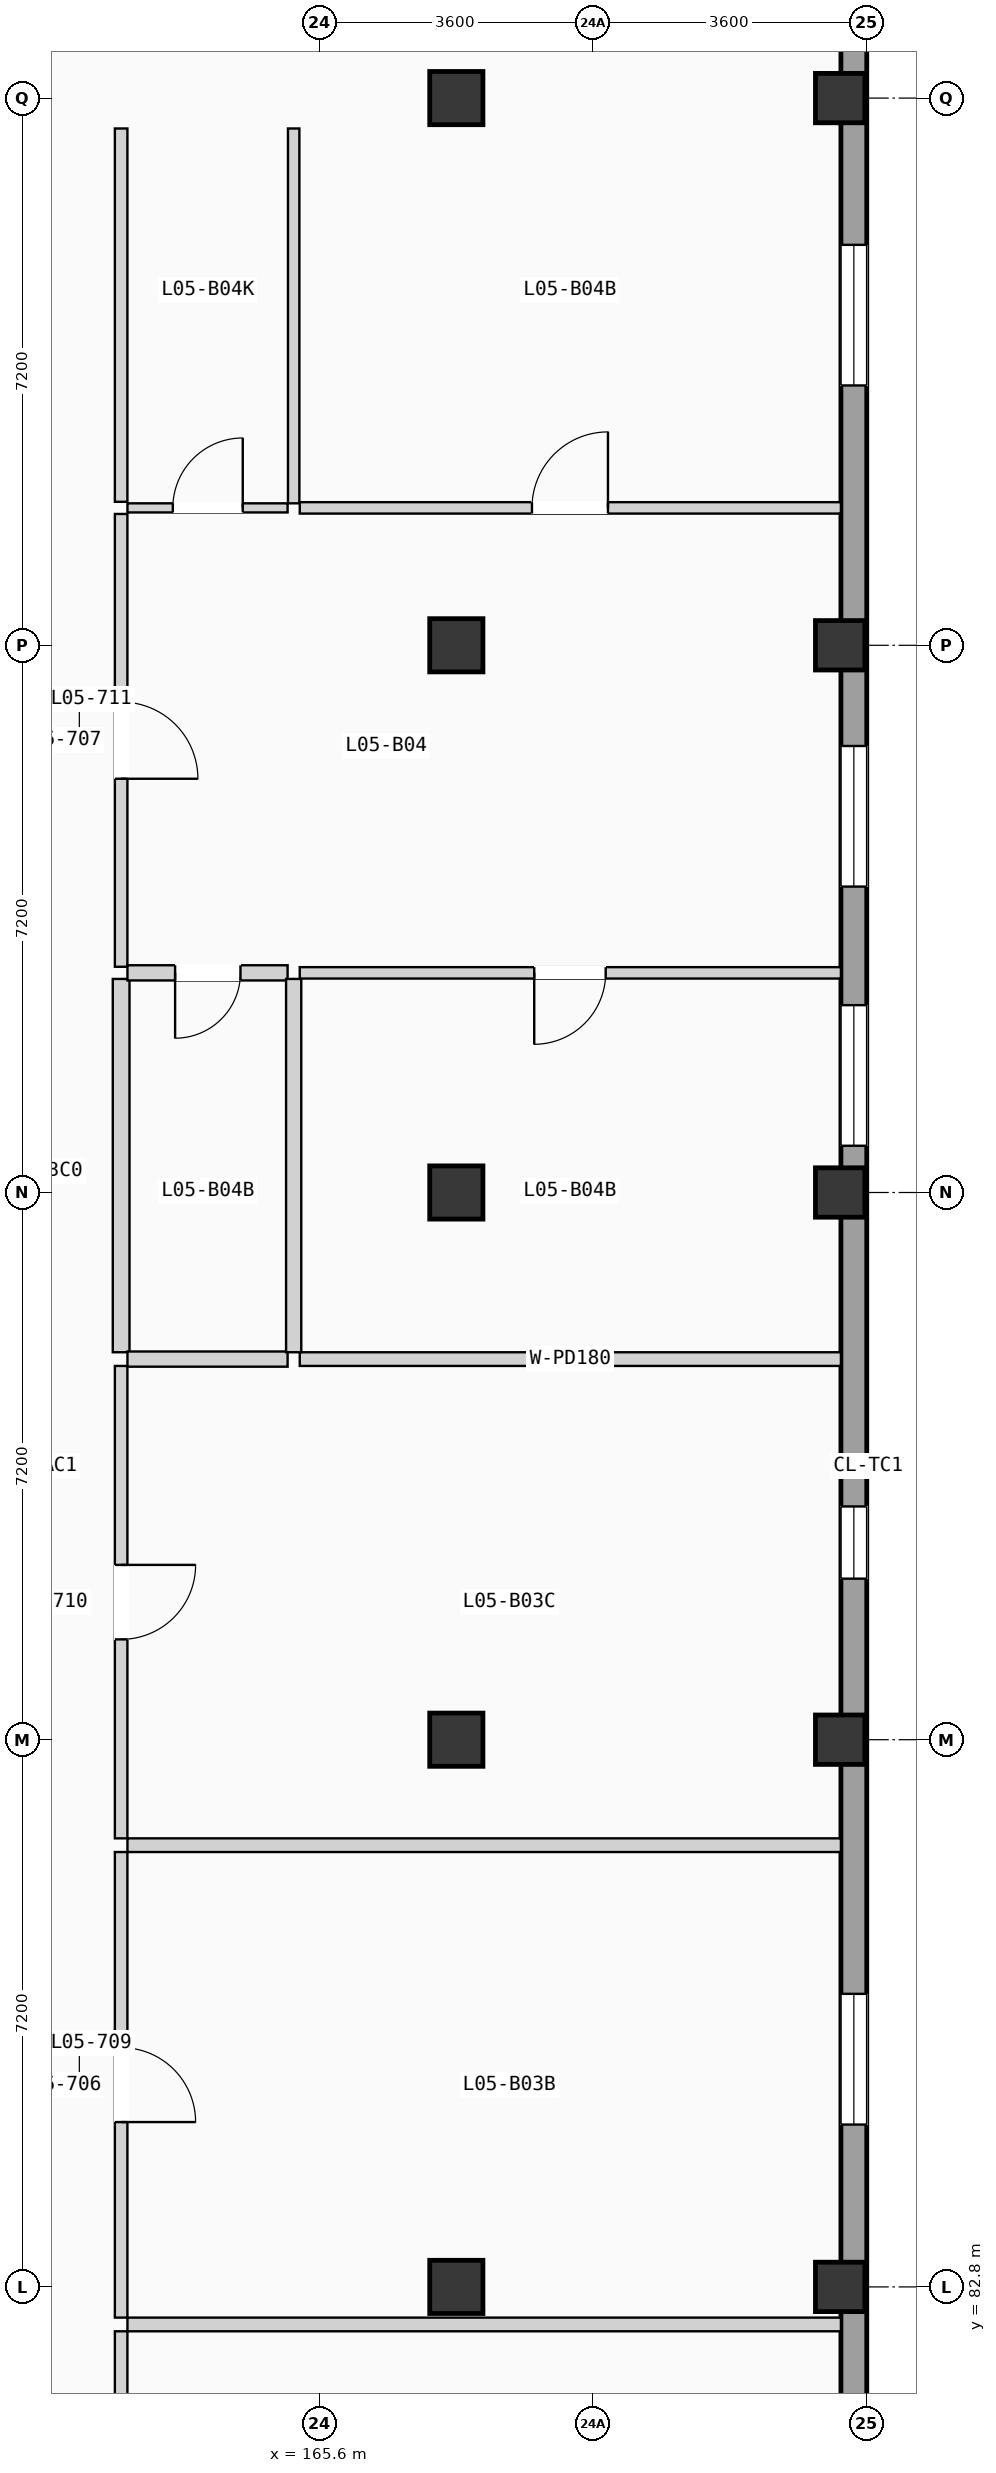
"""IFC4 building model, lengths in metres.
Left out: names, types, materials, properties, quantities, classifications, styles, units other than length and angle.
Written with IfcOpenShell. Run it as: python <this file> out.ifc"""

import sys

from ifc_helpers import new_model, si_unit, direction, frame, frame_2d, origin, origin_2d, place, context, subcontext, project, spatial, rectangle, extrude, element, fill, save


model = new_model("IFC4")
c1 = context("Model", 3, precision=1e-05, world=origin(), true_north=direction((0.0, 1.0)))
c2 = subcontext(c1, "Body", "Model", "MODEL_VIEW")
j1 = project(units=[si_unit("LENGTHUNIT", "METRE"), si_unit("PLANEANGLEUNIT", "RADIAN")], contexts=[c1])
p1 = place(None, origin())
s1 = spatial("IfcSite", under=j1, at=p1, CompositionType="ELEMENT")
p2 = place(p1, origin())
s2 = spatial("IfcBuilding", under=s1, at=p2, CompositionType="ELEMENT")
p3 = place(p2, frame((0.0, 0.0, 18.375)))
s3 = spatial("IfcBuildingStorey", under=s2, at=p3, CompositionType="ELEMENT", Elevation=18.375)
for number, where, z_axis, x_axis in (
    (1, (167.4, 82.8, 0.0), (0.0, 0.0, 1.0), (1.0, 0.0, 0.0)),
    (2, (167.4, 90.0, 0.0), (0.0, 0.0, 1.0), (1.0, 0.0, 0.0)),
    (3, (167.4, 97.2, 0.0), (0.0, 0.0, 1.0), (1.0, 0.0, 0.0)),
    (4, (167.4, 104.4, 0.0), (0.0, 0.0, 1.0), (1.0, 0.0, 0.0)),
    (5, (167.4, 111.6, 0.0), (0.0, 0.0, 1.0), (1.0, 0.0, 0.0)),
):
    element("IfcColumn", number, at=place(p3, frame(where, z_axis=z_axis, x_axis=x_axis)), inside=s3, PredefinedType="COLUMN", context=c2, shape_type="SweptSolid", body=[
        extrude(rectangle(XDim=0.7, YDim=0.7, at=origin_2d()), origin(), (0.0, 0.0, 1.0), 3.15),
    ])
for number, where, z_axis, x_axis in (
    (6, (172.45, 82.8, 0.0), (0.0, 0.0, 1.0), (1.0, 0.0, 0.0)),
    (7, (172.45, 90.0, 0.0), (0.0, 0.0, 1.0), (1.0, 0.0, 0.0)),
    (8, (172.45, 97.2, 0.0), (0.0, 0.0, 1.0), (1.0, 0.0, 0.0)),
    (9, (172.45, 104.4, 0.0), (0.0, 0.0, 1.0), (1.0, 0.0, 0.0)),
    (10, (172.45, 111.6, 0.0), (0.0, 0.0, 1.0), (1.0, 0.0, 0.0)),
):
    element("IfcColumn", number, at=place(p3, frame(where, z_axis=z_axis, x_axis=x_axis)), inside=s3, PredefinedType="COLUMN", context=c2, shape_type="SweptSolid", body=[
        extrude(rectangle(XDim=0.65, YDim=0.65, at=origin_2d()), origin(), (0.0, 0.0, 1.0), 3.15),
    ])
p4 = place(p3, frame((172.63, 68.74, 0.0), z_axis=(0.0, 0.0, 1.0), x_axis=(0.0, 1.0, 0.0)))
e11 = element("IfcWall", 11, at=p4, inside=s3, PredefinedType="SOLIDWALL", context=c2, shape_type="SweptSolid", body=[
    extrude(rectangle(XDim=49.72, YDim=0.34, at=frame_2d((24.86, 0.0))), origin(), (0.0, 0.0, 1.0), 2.89),
])
p5 = place(p4, frame((9.508, 0.0, 0.705)))
e12 = element("IfcOpeningElement", 12, at=p5, cuts=e11, PredefinedType="OPENING", context=c2, shape_type="SweptSolid", body=[
    extrude(rectangle(XDim=1.72, YDim=1.5, at=frame_2d((0.86, 0.75))), frame((0.0, 0.18, 0.0), z_axis=(0.0, -1.0, 0.0), x_axis=(1.0, 0.0, 0.0)), (0.0, 0.0, 1.0), 0.36),
])
p6 = place(p4, frame((16.196, 0.0, 0.555)))
e13 = element("IfcOpeningElement", 13, at=p6, cuts=e11, PredefinedType="OPENING", context=c2, shape_type="SweptSolid", body=[
    extrude(rectangle(XDim=1.72, YDim=1.65, at=frame_2d((0.86, 0.825))), frame((0.0, 0.18, 0.0), z_axis=(0.0, -1.0, 0.0), x_axis=(1.0, 0.0, 0.0)), (0.0, 0.0, 1.0), 0.36),
])
p7 = place(p4, frame((23.379, 0.0, 0.85)))
e14 = element("IfcOpeningElement", 14, at=p7, cuts=e11, PredefinedType="OPENING", context=c2, shape_type="SweptSolid", body=[
    extrude(rectangle(XDim=0.95, YDim=1.2, at=frame_2d((0.475, 0.6))), frame((0.0, 0.18, 0.0), z_axis=(0.0, -1.0, 0.0), x_axis=(1.0, 0.0, 0.0)), (0.0, 0.0, 1.0), 0.36),
])
p8 = place(p4, frame((32.485, 0.0, 0.9)))
e15 = element("IfcOpeningElement", 15, at=p8, cuts=e11, PredefinedType="OPENING", context=c2, shape_type="SweptSolid", body=[
    extrude(rectangle(XDim=1.85, YDim=1.2, at=frame_2d((0.925, 0.6))), frame((0.0, 0.18, 0.0), z_axis=(0.0, -1.0, 0.0), x_axis=(1.0, 0.0, 0.0)), (0.0, 0.0, 1.0), 0.36),
])
p9 = place(p4, frame((29.075, 0.0, 0.855)))
e16 = element("IfcOpeningElement", 16, at=p9, cuts=e11, PredefinedType="OPENING", context=c2, shape_type="SweptSolid", body=[
    extrude(rectangle(XDim=1.85, YDim=1.35, at=frame_2d((0.925, 0.675))), frame((0.0, 0.18, 0.0), z_axis=(0.0, -1.0, 0.0), x_axis=(1.0, 0.0, 0.0)), (0.0, 0.0, 1.0), 0.36),
])
p10 = place(p4, frame((39.079, 0.0, 0.705)))
e17 = element("IfcOpeningElement", 17, at=p10, cuts=e11, PredefinedType="OPENING", context=c2, shape_type="SweptSolid", body=[
    extrude(rectangle(XDim=1.85, YDim=1.5, at=frame_2d((0.925, 0.75))), frame((0.0, 0.18, 0.0), z_axis=(0.0, -1.0, 0.0), x_axis=(1.0, 0.0, 0.0)), (0.0, 0.0, 1.0), 0.36),
])
p11 = place(p3, frame((162.99, 75.945, 0.0), z_axis=(0.0, 0.0, 1.0), x_axis=(0.0, 1.0, 0.0)))
e18 = element("IfcWall", 18, at=p11, inside=s3, PredefinedType="PARTITIONING", context=c2, shape_type="SweptSolid", body=[
    extrude(rectangle(XDim=6.271, YDim=0.165, at=frame_2d((3.135, 0.0))), origin(), (0.0, 0.0, 1.0), 2.87),
])
p12 = place(p11, frame((2.673, 0.0, 0.0)))
e19 = element("IfcOpeningElement", 19, at=p12, cuts=e18, PredefinedType="OPENING", context=c2, shape_type="SweptSolid", body=[
    extrude(rectangle(XDim=0.98, YDim=2.08, at=frame_2d((0.49, 1.04))), frame((0.0, 0.093, 0.0), z_axis=(0.0, -1.0, 0.0), x_axis=(1.0, 0.0, 0.0)), (0.0, 0.0, 1.0), 0.185),
])
p13 = place(p3, frame((162.99, 82.396, 0.0), z_axis=(0.0, 0.0, 1.0), x_axis=(0.0, 1.0, 0.0)))
e20 = element("IfcWall", 20, at=p13, inside=s3, PredefinedType="PARTITIONING", context=c2, shape_type="SweptSolid", body=[
    extrude(rectangle(XDim=6.126, YDim=0.165, at=frame_2d((3.063, 0.0))), origin(), (0.0, 0.0, 1.0), 2.87),
])
p14 = place(p13, frame((2.573, 0.0, 0.0)))
e21 = element("IfcOpeningElement", 21, at=p14, cuts=e20, PredefinedType="OPENING", context=c2, shape_type="SweptSolid", body=[
    extrude(rectangle(XDim=0.98, YDim=2.08, at=frame_2d((0.49, 1.04))), frame((0.0, 0.093, 0.0), z_axis=(0.0, -1.0, 0.0), x_axis=(1.0, 0.0, 0.0)), (0.0, 0.0, 1.0), 0.185),
])
p15 = place(p3, frame((162.99, 88.702, 0.0), z_axis=(0.0, 0.0, 1.0), x_axis=(0.0, 1.0, 0.0)))
e22 = element("IfcWall", 22, at=p15, inside=s3, PredefinedType="PARTITIONING", context=c2, shape_type="SweptSolid", body=[
    extrude(rectangle(XDim=6.216, YDim=0.165, at=frame_2d((3.108, 0.0))), origin(), (0.0, 0.0, 1.0), 2.87),
])
p16 = place(p15, frame((2.618, 0.0, 0.0)))
e23 = element("IfcOpeningElement", 23, at=p16, cuts=e22, PredefinedType="OPENING", context=c2, shape_type="SweptSolid", body=[
    extrude(rectangle(XDim=0.98, YDim=2.08, at=frame_2d((0.49, 1.04))), frame((0.0, 0.093, 0.0), z_axis=(0.0, -1.0, 0.0), x_axis=(1.0, 0.0, 0.0)), (0.0, 0.0, 1.0), 0.185),
])
p17 = place(p3, frame((162.99, 100.17, 0.0), z_axis=(0.0, 0.0, 1.0), x_axis=(0.0, 1.0, 0.0)))
e24 = element("IfcWall", 24, at=p17, inside=s3, PredefinedType="PARTITIONING", context=c2, shape_type="SweptSolid", body=[
    extrude(rectangle(XDim=5.958, YDim=0.165, at=frame_2d((2.979, 0.0))), origin(), (0.0, 0.0, 1.0), 2.87),
])
p18 = place(p17, frame((2.474, 0.0, 0.0)))
e25 = element("IfcOpeningElement", 25, at=p18, cuts=e24, PredefinedType="OPENING", context=c2, shape_type="SweptSolid", body=[
    extrude(rectangle(XDim=1.01, YDim=2.11, at=frame_2d((0.505, 1.055))), frame((0.0, 0.093, 0.0), z_axis=(0.0, -1.0, 0.0), x_axis=(1.0, 0.0, 0.0)), (0.0, 0.0, 1.0), 0.185),
])
p19 = place(p3, frame((162.99, 95.098, 0.0), z_axis=(0.0, 0.0, 1.0), x_axis=(0.0, 1.0, 0.0)))
e26 = element("IfcWall", 26, at=p19, inside=s3, PredefinedType="PLUMBINGWALL", context=c2, shape_type="SweptSolid", body=[
    extrude(rectangle(XDim=4.912, YDim=0.22, at=frame_2d((2.456, 0.0))), origin(), (0.0, 0.0, 1.0), 2.87),
])
p20 = place(p3, frame((162.99, 106.288, 0.0), z_axis=(0.0, 0.0, 1.0), x_axis=(0.0, 1.0, 0.0)))
e27 = element("IfcWall", 27, at=p20, inside=s3, PredefinedType="PARTITIONING", context=c2, shape_type="SweptSolid", body=[
    extrude(rectangle(XDim=4.912, YDim=0.165, at=frame_2d((2.456, 0.0))), origin(), (0.0, 0.0, 1.0), 2.87),
])
for number, where, z_axis, x_axis in (
    (28, (163.073, 82.306, 0.0), (0.0, 0.0, 1.0), (1.0, 0.0, 0.0)),
    (29, (163.073, 88.612, 0.0), (0.0, 0.0, 1.0), (1.0, 0.0, 0.0)),
):
    element("IfcWall", number, at=place(p3, frame(where, z_axis=z_axis, x_axis=x_axis)), inside=s3, PredefinedType="PARTITIONING", context=c2, shape_type="SweptSolid", body=[
        extrude(rectangle(XDim=9.387, YDim=0.18, at=frame_2d((4.693, 0.0))), origin(), (0.0, 0.0, 1.0), 2.87),
    ])
p21 = place(p3, frame((163.073, 95.008, 0.0), z_axis=(0.0, 0.0, 1.0), x_axis=(1.0, 0.0, 0.0)))
e30 = element("IfcWall", 30, at=p21, inside=s3, PredefinedType="PLUMBINGWALL", context=c2, shape_type="SweptSolid", body=[
    extrude(rectangle(XDim=2.107, YDim=0.2, at=frame_2d((1.053, 0.0))), origin(), (0.0, 0.0, 1.0), 2.87),
])
p22 = place(p3, frame((165.34, 95.008, 0.0), z_axis=(0.0, 0.0, 1.0), x_axis=(1.0, 0.0, 0.0)))
e31 = element("IfcWall", 31, at=p22, inside=s3, PredefinedType="PARTITIONING", context=c2, shape_type="SweptSolid", body=[
    extrude(rectangle(XDim=7.12, YDim=0.18, at=frame_2d((3.56, 0.0))), origin(), (0.0, 0.0, 1.0), 2.87),
])
p23 = place(p3, frame((163.073, 100.09, 0.0), z_axis=(0.0, 0.0, 1.0), x_axis=(1.0, 0.0, 0.0)))
e32 = element("IfcWall", 32, at=p23, inside=s3, PredefinedType="PLUMBINGWALL", context=c2, shape_type="SweptSolid", body=[
    extrude(rectangle(XDim=2.107, YDim=0.2, at=frame_2d((1.053, 0.0))), origin(), (0.0, 0.0, 1.0), 2.87),
])
p24 = place(p23, frame((0.627, 0.0, 0.0)))
e33 = element("IfcOpeningElement", 33, at=p24, cuts=e32, PredefinedType="OPENING", context=c2, shape_type="SweptSolid", body=[
    extrude(rectangle(XDim=0.86, YDim=2.0, at=frame_2d((0.43, 1.0))), frame((0.0, 0.11, 0.0), z_axis=(0.0, -1.0, 0.0), x_axis=(1.0, 0.0, 0.0)), (0.0, 0.0, 1.0), 0.22),
])
p25 = place(p3, frame((163.073, 106.208, 0.0), z_axis=(0.0, 0.0, 1.0), x_axis=(1.0, 0.0, 0.0)))
e34 = element("IfcWall", 34, at=p25, inside=s3, PredefinedType="PARTITIONING", context=c2, shape_type="SweptSolid", body=[
    extrude(rectangle(XDim=2.107, YDim=0.12, at=frame_2d((1.053, 0.0))), origin(), (0.0, 0.0, 1.0), 2.87),
])
p26 = place(p25, frame((0.597, 0.0, 0.0)))
e35 = element("IfcOpeningElement", 35, at=p26, cuts=e34, PredefinedType="OPENING", context=c2, shape_type="SweptSolid", body=[
    extrude(rectangle(XDim=0.92, YDim=2.02, at=frame_2d((0.46, 1.01))), frame((0.0, 0.07, 0.0), z_axis=(0.0, -1.0, 0.0), x_axis=(1.0, 0.0, 0.0)), (0.0, 0.0, 1.0), 0.14),
])
p27 = place(p3, frame((165.34, 100.09, 0.0), z_axis=(0.0, 0.0, 1.0), x_axis=(1.0, 0.0, 0.0)))
e36 = element("IfcWall", 36, at=p27, inside=s3, PredefinedType="PARTITIONING", context=c2, shape_type="SweptSolid", body=[
    extrude(rectangle(XDim=7.12, YDim=0.15, at=frame_2d((3.56, 0.0))), origin(), (0.0, 0.0, 1.0), 2.87),
])
p28 = place(p27, frame((3.085, 0.0, 0.0)))
e37 = element("IfcOpeningElement", 37, at=p28, cuts=e36, PredefinedType="OPENING", context=c2, shape_type="SweptSolid", body=[
    extrude(rectangle(XDim=0.94, YDim=2.06, at=frame_2d((0.47, 1.03))), frame((0.0, 0.085, 0.0), z_axis=(0.0, -1.0, 0.0), x_axis=(1.0, 0.0, 0.0)), (0.0, 0.0, 1.0), 0.17),
])
p29 = place(p3, frame((165.34, 106.208, 0.0), z_axis=(0.0, 0.0, 1.0), x_axis=(1.0, 0.0, 0.0)))
e38 = element("IfcWall", 38, at=p29, inside=s3, PredefinedType="PARTITIONING", context=c2, shape_type="SweptSolid", body=[
    extrude(rectangle(XDim=7.12, YDim=0.15, at=frame_2d((3.56, 0.0))), origin(), (0.0, 0.0, 1.0), 2.87),
])
p30 = place(p29, frame((3.055, 0.0, 0.0)))
e39 = element("IfcOpeningElement", 39, at=p30, cuts=e38, PredefinedType="OPENING", context=c2, shape_type="SweptSolid", body=[
    extrude(rectangle(XDim=1.0, YDim=2.06, at=frame_2d((0.5, 1.03))), frame((0.0, 0.085, 0.0), z_axis=(0.0, -1.0, 0.0), x_axis=(1.0, 0.0, 0.0)), (0.0, 0.0, 1.0), 0.17),
])
p31 = place(p3, frame((165.26, 95.098, 0.0), z_axis=(0.0, 0.0, 1.0), x_axis=(0.0, 1.0, 0.0)))
e40 = element("IfcWall", 40, at=p31, inside=s3, PredefinedType="PLUMBINGWALL", context=c2, shape_type="SweptSolid", body=[
    extrude(rectangle(XDim=4.912, YDim=0.2, at=frame_2d((2.456, 0.0))), origin(), (0.0, 0.0, 1.0), 2.87),
])
p32 = place(p3, frame((165.26, 106.268, 0.0), z_axis=(0.0, 0.0, 1.0), x_axis=(0.0, 1.0, 0.0)))
e41 = element("IfcWall", 41, at=p32, inside=s3, PredefinedType="PARTITIONING", context=c2, shape_type="SweptSolid", body=[
    extrude(rectangle(XDim=4.932, YDim=0.15, at=frame_2d((2.466, 0.0))), origin(), (0.0, 0.0, 1.0), 2.87),
])
p33 = place(p6, origin())
e42 = element("IfcWindow", 42, at=p33, inside=s3, PartitioningType="DOUBLE_PANEL_VERTICAL", PredefinedType="WINDOW", context=c2, shape_type="SweptSolid", body=[
    extrude(rectangle(XDim=1.72, YDim=1.65, at=frame_2d((0.86, 0.825))), frame((0.0, 0.03, 0.0), z_axis=(0.0, -1.0, 0.0), x_axis=(1.0, 0.0, 0.0)), (0.0, 0.0, 1.0), 0.06),
])
fill(e13, e42)
p34 = place(p7, origin())
e43 = element("IfcWindow", 43, at=p34, inside=s3, PartitioningType="SINGLE_PANEL", PredefinedType="WINDOW", context=c2, shape_type="SweptSolid", body=[
    extrude(rectangle(XDim=0.95, YDim=1.2, at=frame_2d((0.475, 0.6))), frame((0.0, 0.03, 0.0), z_axis=(0.0, -1.0, 0.0), x_axis=(1.0, 0.0, 0.0)), (0.0, 0.0, 1.0), 0.06),
])
fill(e14, e43)
p35 = place(p8, origin())
e44 = element("IfcWindow", 44, at=p35, inside=s3, PartitioningType="DOUBLE_PANEL_VERTICAL", PredefinedType="WINDOW", context=c2, shape_type="SweptSolid", body=[
    extrude(rectangle(XDim=1.85, YDim=1.2, at=frame_2d((0.925, 0.6))), frame((0.0, 0.03, 0.0), z_axis=(0.0, -1.0, 0.0), x_axis=(1.0, 0.0, 0.0)), (0.0, 0.0, 1.0), 0.06),
])
fill(e15, e44)
p36 = place(p9, origin())
e45 = element("IfcWindow", 45, at=p36, inside=s3, PartitioningType="DOUBLE_PANEL_VERTICAL", PredefinedType="WINDOW", context=c2, shape_type="SweptSolid", body=[
    extrude(rectangle(XDim=1.85, YDim=1.35, at=frame_2d((0.925, 0.675))), frame((0.0, 0.03, 0.0), z_axis=(0.0, -1.0, 0.0), x_axis=(1.0, 0.0, 0.0)), (0.0, 0.0, 1.0), 0.06),
])
fill(e16, e45)
p37 = place(p10, origin())
e46 = element("IfcWindow", 46, at=p37, inside=s3, PartitioningType="DOUBLE_PANEL_VERTICAL", PredefinedType="WINDOW", context=c2, shape_type="SweptSolid", body=[
    extrude(rectangle(XDim=1.85, YDim=1.5, at=frame_2d((0.925, 0.75))), frame((0.0, 0.03, 0.0), z_axis=(0.0, -1.0, 0.0), x_axis=(1.0, 0.0, 0.0)), (0.0, 0.0, 1.0), 0.06),
])
fill(e17, e46)
p38 = place(p14, frame((0.98, 0.0, 0.0), z_axis=(0.0, 0.0, 1.0), x_axis=(-1.0, 0.0, 0.0)))
e47 = element("IfcDoor", 47, at=p38, inside=s3, OperationType="SINGLE_SWING_LEFT", PredefinedType="DOOR", context=c2, shape_type="SweptSolid", body=[
    extrude(rectangle(XDim=0.98, YDim=2.08, at=frame_2d((0.49, 1.04))), frame((0.0, 0.025, 0.0), z_axis=(0.0, -1.0, 0.0), x_axis=(1.0, 0.0, 0.0)), (0.0, 0.0, 1.0), 0.05),
])
fill(e21, e47)
p39 = place(p16, frame((0.98, 0.0, 0.0), z_axis=(0.0, 0.0, 1.0), x_axis=(-1.0, 0.0, 0.0)))
e48 = element("IfcDoor", 48, at=p39, inside=s3, OperationType="SINGLE_SWING_RIGHT", PredefinedType="DOOR", context=c2, shape_type="SweptSolid", body=[
    extrude(rectangle(XDim=0.98, YDim=2.08, at=frame_2d((0.49, 1.04))), frame((0.0, 0.025, 0.0), z_axis=(0.0, -1.0, 0.0), x_axis=(1.0, 0.0, 0.0)), (0.0, 0.0, 1.0), 0.05),
])
fill(e23, e48)
p40 = place(p18, frame((1.01, 0.0, 0.0), z_axis=(0.0, 0.0, 1.0), x_axis=(-1.0, 0.0, 0.0)))
e49 = element("IfcDoor", 49, at=p40, inside=s3, OperationType="SINGLE_SWING_LEFT", PredefinedType="DOOR", context=c2, shape_type="SweptSolid", body=[
    extrude(rectangle(XDim=1.01, YDim=2.11, at=frame_2d((0.505, 1.055))), frame((0.0, 0.025, 0.0), z_axis=(0.0, -1.0, 0.0), x_axis=(1.0, 0.0, 0.0)), (0.0, 0.0, 1.0), 0.05),
])
fill(e25, e49)
p41 = place(p24, frame((0.86, 0.0, 0.0), z_axis=(0.0, 0.0, 1.0), x_axis=(-1.0, 0.0, 0.0)))
e50 = element("IfcDoor", 50, at=p41, inside=s3, OperationType="SINGLE_SWING_LEFT", PredefinedType="DOOR", context=c2, shape_type="SweptSolid", body=[
    extrude(rectangle(XDim=0.86, YDim=2.0, at=frame_2d((0.43, 1.0))), frame((0.0, 0.025, 0.0), z_axis=(0.0, -1.0, 0.0), x_axis=(1.0, 0.0, 0.0)), (0.0, 0.0, 1.0), 0.05),
])
fill(e33, e50)
p42 = place(p26, origin())
e51 = element("IfcDoor", 51, at=p42, inside=s3, OperationType="SINGLE_SWING_RIGHT", PredefinedType="DOOR", context=c2, shape_type="SweptSolid", body=[
    extrude(rectangle(XDim=0.92, YDim=2.02, at=frame_2d((0.46, 1.01))), frame((0.0, 0.025, 0.0), z_axis=(0.0, -1.0, 0.0), x_axis=(1.0, 0.0, 0.0)), (0.0, 0.0, 1.0), 0.05),
])
fill(e35, e51)
p43 = place(p28, frame((0.94, 0.0, 0.0), z_axis=(0.0, 0.0, 1.0), x_axis=(-1.0, 0.0, 0.0)))
e52 = element("IfcDoor", 52, at=p43, inside=s3, OperationType="SINGLE_SWING_LEFT", PredefinedType="DOOR", context=c2, shape_type="SweptSolid", body=[
    extrude(rectangle(XDim=0.94, YDim=2.06, at=frame_2d((0.47, 1.03))), frame((0.0, 0.025, 0.0), z_axis=(0.0, -1.0, 0.0), x_axis=(1.0, 0.0, 0.0)), (0.0, 0.0, 1.0), 0.05),
])
fill(e37, e52)
p44 = place(p30, origin())
e53 = element("IfcDoor", 53, at=p44, inside=s3, OperationType="SINGLE_SWING_RIGHT", PredefinedType="DOOR", context=c2, shape_type="SweptSolid", body=[
    extrude(rectangle(XDim=1.0, YDim=2.06, at=frame_2d((0.5, 1.03))), frame((0.0, 0.025, 0.0), z_axis=(0.0, -1.0, 0.0), x_axis=(1.0, 0.0, 0.0)), (0.0, 0.0, 1.0), 0.05),
])
fill(e39, e53)
save(model, sys.argv[1])
